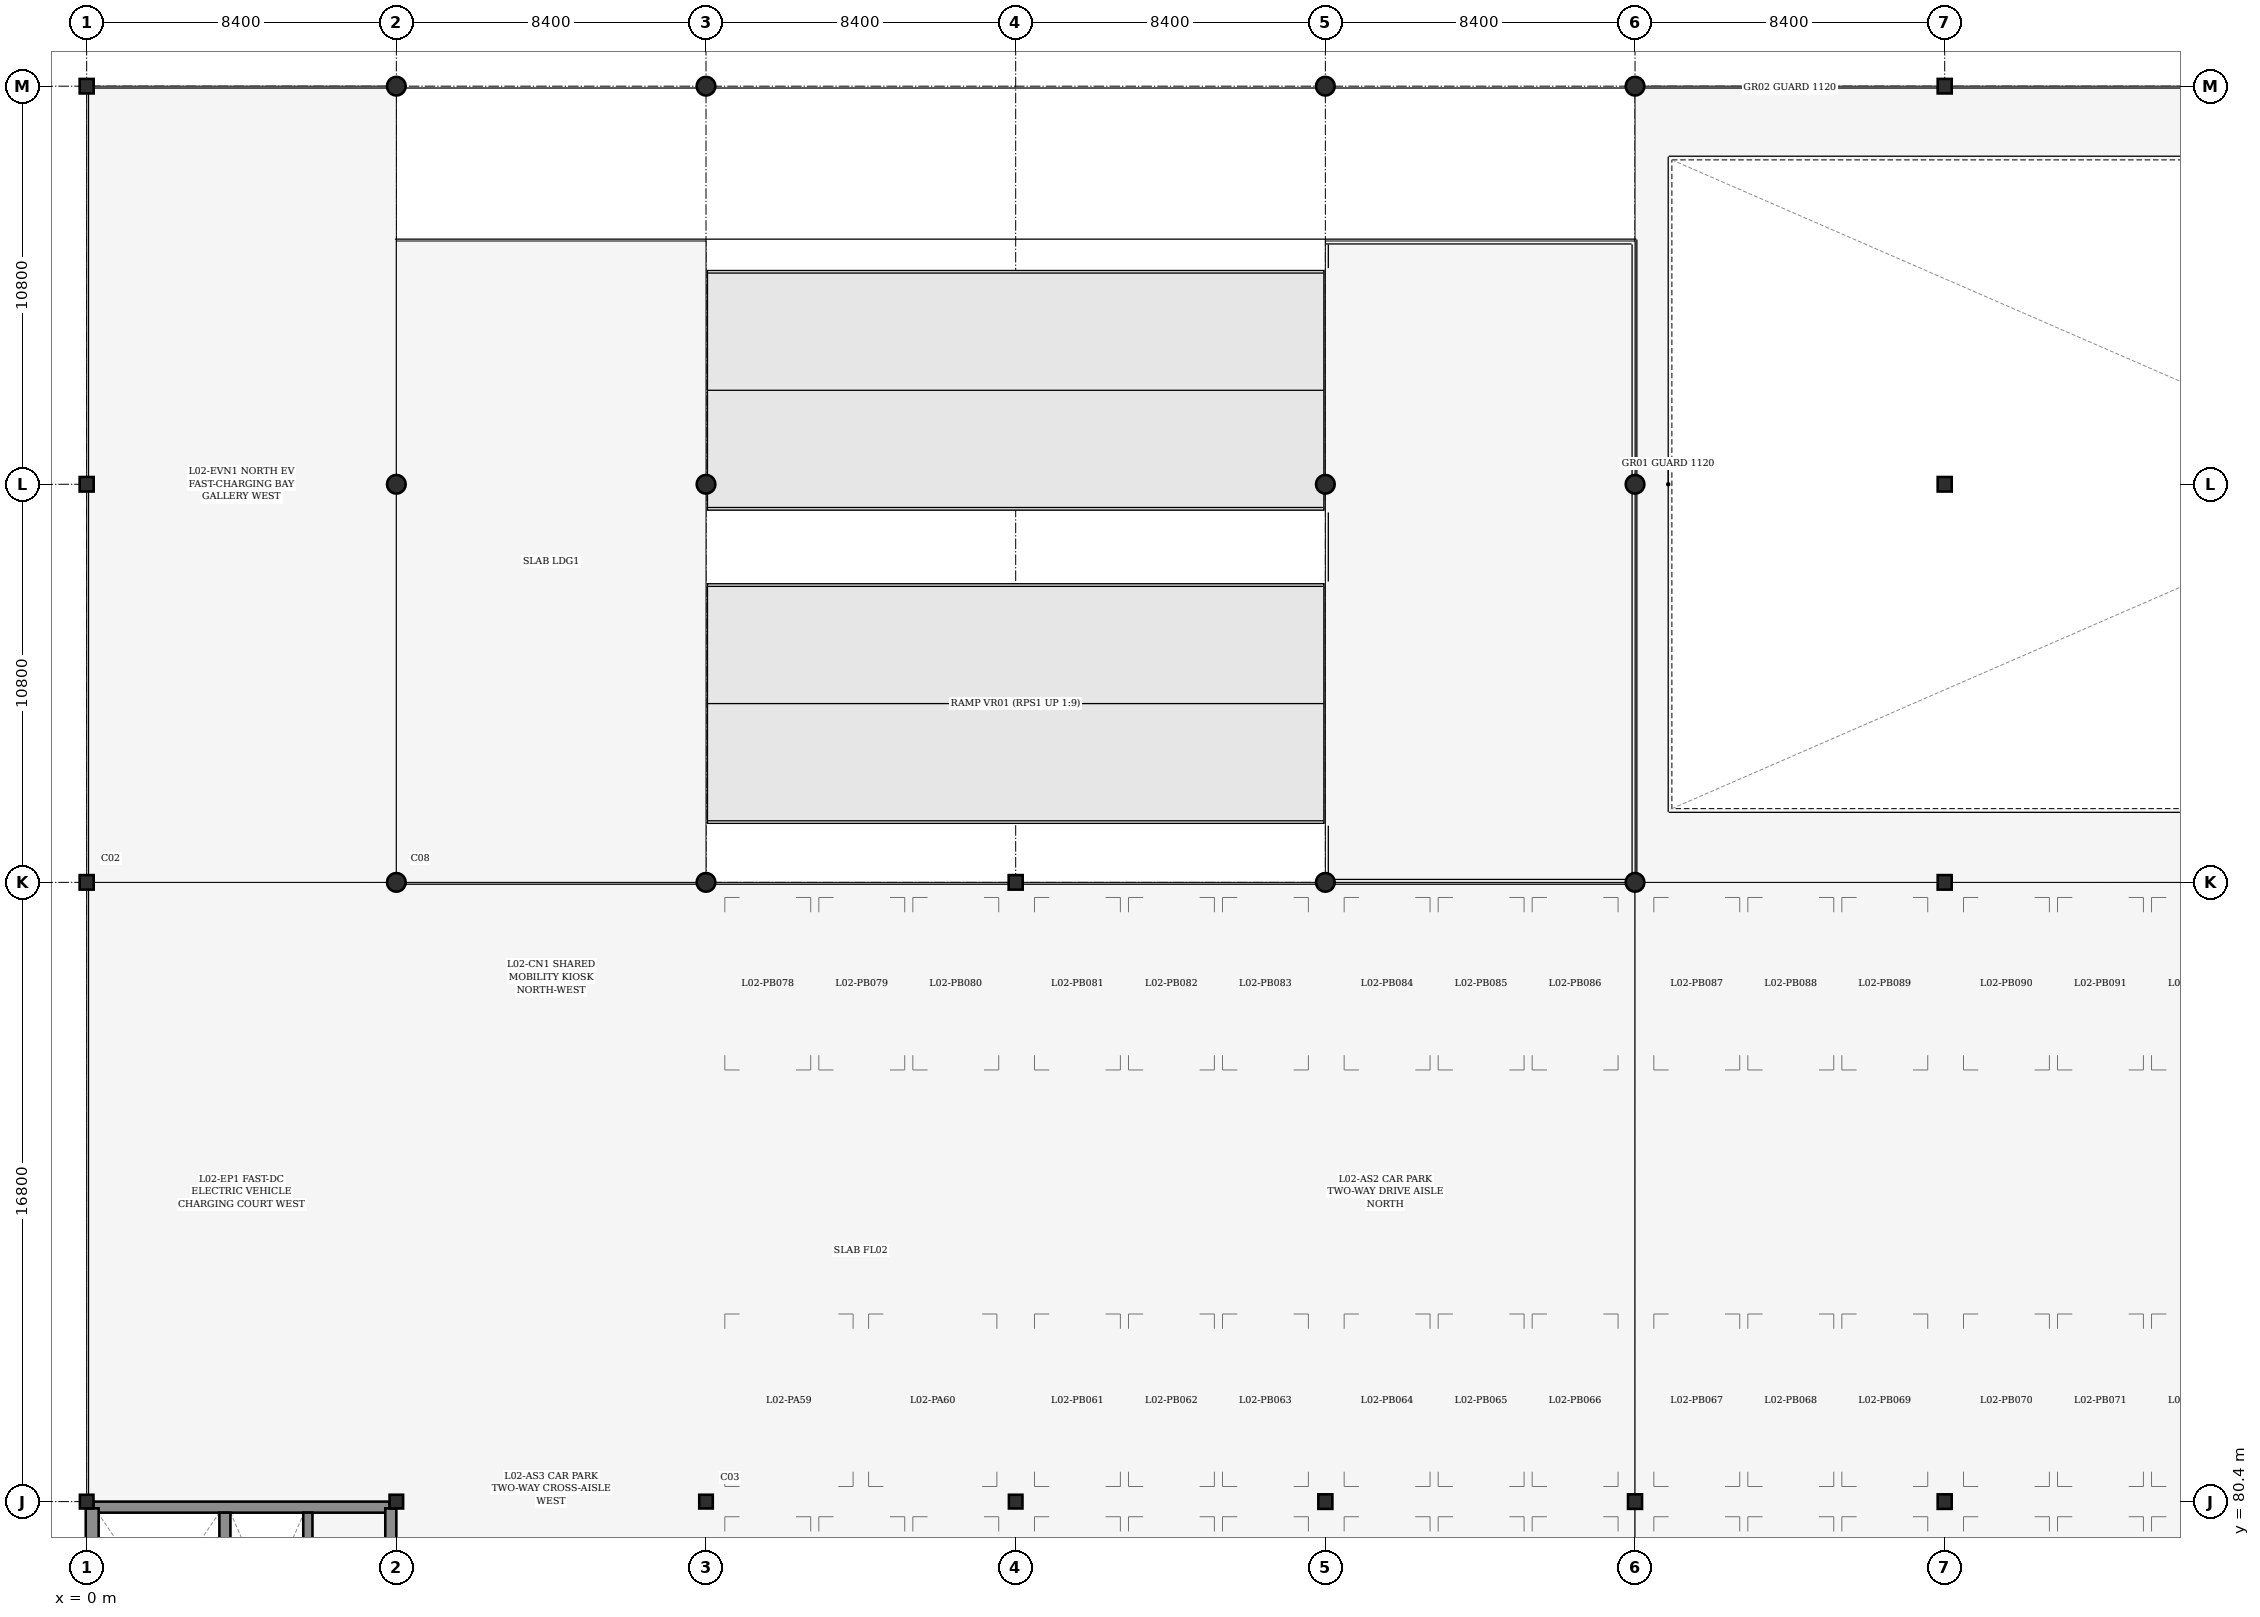
"""IFC4 building model, lengths in metres.
Left out: names, types, materials, properties, quantities, classifications, styles, units other than length and angle.
Written with IfcOpenShell. Run it as: python <this file> out.ifc"""

import sys

from ifc_helpers import new_model, si_unit, direction, frame, frame_2d, origin, origin_2d, place, context, subcontext, project, spatial, rectangle, hollow_circle, i_section, extrude, element, save


model = new_model("IFC4")
c1 = context("Model", 3, precision=1e-05, world=origin(), true_north=direction((0.0, 1.0)))
c2 = subcontext(c1, "Body", "Model", "MODEL_VIEW")
j1 = project(units=[si_unit("LENGTHUNIT", "METRE"), si_unit("PLANEANGLEUNIT", "RADIAN")], contexts=[c1])
p1 = place(None, origin())
s1 = spatial("IfcSite", under=j1, at=p1, CompositionType="ELEMENT")
p2 = place(p1, origin())
s2 = spatial("IfcBuilding", under=s1, at=p2, CompositionType="ELEMENT")
p3 = place(p2, frame((0.0, 0.0, 9.0)))
s3 = spatial("IfcBuildingStorey", under=s2, at=p3, CompositionType="ELEMENT", Elevation=9.0)
p4 = place(p3, frame((0.0, 80.4, 0.0), z_axis=(0.0, 0.0, 1.0), x_axis=(1.0, 0.0, 0.0)))
e1 = element("IfcColumn", 1, at=p4, inside=s3, PredefinedType="COLUMN", context=c2, shape_type="SweptSolid", body=[
    extrude(i_section(OverallWidth=0.373, OverallDepth=0.368, WebThickness=0.014, FlangeThickness=0.024, FilletRadius=0.015, at=origin_2d()), origin(), (0.0, 0.0, 1.0), 3.6),
])
for number, where, z_axis, x_axis in (
    (2, (0.0, 97.2, 0.0), (0.0, 0.0, 1.0), (1.0, 0.0, 0.0)),
    (3, (0.0, 108.0, 0.0), (0.0, 0.0, 1.0), (1.0, 0.0, 0.0)),
    (4, (0.0, 118.8, 0.0), (0.0, 0.0, 1.0), (1.0, 0.0, 0.0)),
):
    element("IfcColumn", number, at=place(p3, frame(where, z_axis=z_axis, x_axis=x_axis)), inside=s3, PredefinedType="COLUMN", context=c2, shape_type="SweptSolid", body=[
        extrude(i_section(OverallWidth=0.395, OverallDepth=0.381, WebThickness=0.018, FlangeThickness=0.03, FilletRadius=0.015, at=origin_2d()), origin(), (0.0, 0.0, 1.0), 3.6),
    ])
p5 = place(p3, frame((8.4, 80.4, 0.0), z_axis=(0.0, 0.0, 1.0), x_axis=(1.0, 0.0, 0.0)))
e5 = element("IfcColumn", 5, at=p5, inside=s3, PredefinedType="COLUMN", context=c2, shape_type="SweptSolid", body=[
    extrude(i_section(OverallWidth=0.373, OverallDepth=0.368, WebThickness=0.014, FlangeThickness=0.024, FilletRadius=0.015, at=origin_2d()), origin(), (0.0, 0.0, 1.0), 3.6),
])
for number, where, z_axis, x_axis in (
    (6, (8.4, 97.2, 0.0), (0.0, 0.0, 1.0), (1.0, 0.0, 0.0)),
    (7, (8.4, 108.0, 0.0), (0.0, 0.0, 1.0), (1.0, 0.0, 0.0)),
    (8, (8.4, 118.8, 0.0), (0.0, 0.0, 1.0), (1.0, 0.0, 0.0)),
):
    element("IfcColumn", number, at=place(p3, frame(where, z_axis=z_axis, x_axis=x_axis)), inside=s3, PredefinedType="COLUMN", context=c2, shape_type="SweptSolid", body=[
        extrude(hollow_circle(Radius=0.254, WallThickness=0.016, at=origin_2d()), origin(), (0.0, 0.0, 1.0), 3.6),
    ])
p6 = place(p3, frame((16.8, 80.4, 0.0), z_axis=(0.0, 0.0, 1.0), x_axis=(1.0, 0.0, 0.0)))
e9 = element("IfcColumn", 9, at=p6, inside=s3, PredefinedType="COLUMN", context=c2, shape_type="SweptSolid", body=[
    extrude(i_section(OverallWidth=0.373, OverallDepth=0.368, WebThickness=0.014, FlangeThickness=0.024, FilletRadius=0.015, at=origin_2d()), origin(), (0.0, 0.0, 1.0), 3.6),
])
for number, where, z_axis, x_axis in (
    (10, (16.8, 97.2, 0.0), (0.0, 0.0, 1.0), (1.0, 0.0, 0.0)),
    (11, (16.8, 108.0, 0.0), (0.0, 0.0, 1.0), (1.0, 0.0, 0.0)),
    (12, (16.8, 118.8, 0.0), (0.0, 0.0, 1.0), (1.0, 0.0, 0.0)),
):
    element("IfcColumn", number, at=place(p3, frame(where, z_axis=z_axis, x_axis=x_axis)), inside=s3, PredefinedType="COLUMN", context=c2, shape_type="SweptSolid", body=[
        extrude(hollow_circle(Radius=0.254, WallThickness=0.016, at=origin_2d()), origin(), (0.0, 0.0, 1.0), 3.6),
    ])
p7 = place(p3, frame((25.2, 80.4, 0.0), z_axis=(0.0, 0.0, 1.0), x_axis=(1.0, 0.0, 0.0)))
e13 = element("IfcColumn", 13, at=p7, inside=s3, PredefinedType="COLUMN", context=c2, shape_type="SweptSolid", body=[
    extrude(i_section(OverallWidth=0.373, OverallDepth=0.368, WebThickness=0.014, FlangeThickness=0.024, FilletRadius=0.015, at=origin_2d()), origin(), (0.0, 0.0, 1.0), 3.6),
])
for number, where, z_axis, x_axis in (
    (14, (25.2, 97.2, 0.0), (0.0, 0.0, 1.0), (1.0, 0.0, 0.0)),
    (15, (33.6, 80.4, 0.0), (0.0, 0.0, 1.0), (1.0, 0.0, 0.0)),
):
    element("IfcColumn", number, at=place(p3, frame(where, z_axis=z_axis, x_axis=x_axis)), inside=s3, PredefinedType="COLUMN", context=c2, shape_type="SweptSolid", body=[
        extrude(i_section(OverallWidth=0.395, OverallDepth=0.381, WebThickness=0.018, FlangeThickness=0.03, FilletRadius=0.015, at=origin_2d()), origin(), (0.0, 0.0, 1.0), 3.6),
    ])
for number, where, z_axis, x_axis in (
    (16, (33.6, 97.2, 0.0), (0.0, 0.0, 1.0), (1.0, 0.0, 0.0)),
    (17, (33.6, 108.0, 0.0), (0.0, 0.0, 1.0), (1.0, 0.0, 0.0)),
    (18, (33.6, 118.8, 0.0), (0.0, 0.0, 1.0), (1.0, 0.0, 0.0)),
):
    element("IfcColumn", number, at=place(p3, frame(where, z_axis=z_axis, x_axis=x_axis)), inside=s3, PredefinedType="COLUMN", context=c2, shape_type="SweptSolid", body=[
        extrude(hollow_circle(Radius=0.254, WallThickness=0.016, at=origin_2d()), origin(), (0.0, 0.0, 1.0), 3.6),
    ])
p8 = place(p3, frame((42.0, 80.4, 0.0), z_axis=(0.0, 0.0, 1.0), x_axis=(1.0, 0.0, 0.0)))
e19 = element("IfcColumn", 19, at=p8, inside=s3, PredefinedType="COLUMN", context=c2, shape_type="SweptSolid", body=[
    extrude(i_section(OverallWidth=0.395, OverallDepth=0.381, WebThickness=0.018, FlangeThickness=0.03, FilletRadius=0.015, at=origin_2d()), origin(), (0.0, 0.0, 1.0), 3.6),
])
for number, where, z_axis, x_axis in (
    (20, (42.0, 97.2, 0.0), (0.0, 0.0, 1.0), (1.0, 0.0, 0.0)),
    (21, (42.0, 108.0, 0.0), (0.0, 0.0, 1.0), (1.0, 0.0, 0.0)),
    (22, (42.0, 118.8, 0.0), (0.0, 0.0, 1.0), (1.0, 0.0, 0.0)),
):
    element("IfcColumn", number, at=place(p3, frame(where, z_axis=z_axis, x_axis=x_axis)), inside=s3, PredefinedType="COLUMN", context=c2, shape_type="SweptSolid", body=[
        extrude(hollow_circle(Radius=0.254, WallThickness=0.016, at=origin_2d()), origin(), (0.0, 0.0, 1.0), 3.6),
    ])
for number, where, z_axis, x_axis in (
    (23, (50.4, 80.4, 0.0), (0.0, 0.0, 1.0), (1.0, 0.0, 0.0)),
    (24, (50.4, 97.2, 0.0), (0.0, 0.0, 1.0), (1.0, 0.0, 0.0)),
    (25, (50.4, 108.0, 0.0), (0.0, 0.0, 1.0), (1.0, 0.0, 0.0)),
    (26, (50.4, 118.8, 0.0), (0.0, 0.0, 1.0), (1.0, 0.0, 0.0)),
):
    element("IfcColumn", number, at=place(p3, frame(where, z_axis=z_axis, x_axis=x_axis)), inside=s3, PredefinedType="COLUMN", context=c2, shape_type="SweptSolid", body=[
        extrude(i_section(OverallWidth=0.395, OverallDepth=0.381, WebThickness=0.018, FlangeThickness=0.03, FilletRadius=0.015, at=origin_2d()), origin(), (0.0, 0.0, 1.0), 3.6),
    ])
p9 = place(p3, frame((0.185, 80.25, 0.0), z_axis=(0.0, 0.0, 1.0), x_axis=(1.0, 0.0, 0.0)))
e27 = element("IfcWall", 27, at=p9, inside=s3, PredefinedType="SHEAR", context=c2, shape_type="SweptSolid", body=[
    extrude(rectangle(XDim=8.031, YDim=0.3, at=frame_2d((4.016, 0.0))), origin(), (0.0, 0.0, 1.0), 3.38),
])
p10 = place(p3, frame((0.15, 63.782, 0.0), z_axis=(0.0, 0.0, 1.0), x_axis=(0.0, 1.0, 0.0)))
e28 = element("IfcWall", 28, at=p10, inside=s3, PredefinedType="SHEAR", context=c2, shape_type="SweptSolid", body=[
    extrude(rectangle(XDim=16.436, YDim=0.35, at=frame_2d((8.218, 0.0))), origin(), (0.0, 0.0, 1.0), 3.38),
])
p11 = place(p3, frame((8.25, 63.782, 0.0), z_axis=(0.0, 0.0, 1.0), x_axis=(0.0, 1.0, 0.0)))
e29 = element("IfcWall", 29, at=p11, inside=s3, PredefinedType="SHEAR", context=c2, shape_type="SweptSolid", body=[
    extrude(rectangle(XDim=16.436, YDim=0.3, at=frame_2d((8.218, 0.0))), origin(), (0.0, 0.0, 1.0), 3.38),
])
p12 = place(p11, frame((5.668, 0.0, 0.0)))
e30 = element("IfcOpeningElement", 30, at=p12, cuts=e29, PredefinedType="OPENING", context=c2, shape_type="SweptSolid", body=[
    extrude(rectangle(XDim=1.25, YDim=2.15, at=frame_2d((0.625, 1.075))), frame((0.0, 0.16, 0.0), z_axis=(0.0, -1.0, 0.0), x_axis=(1.0, 0.0, 0.0)), (0.0, 0.0, 1.0), 0.32),
])
p13 = place(p3, frame((3.75, 63.9, 0.0), z_axis=(0.0, 0.0, 1.0), x_axis=(0.0, 1.0, 0.0)))
e31 = element("IfcWall", 31, at=p13, inside=s3, PredefinedType="SHEAR", context=c2, shape_type="SweptSolid", body=[
    extrude(rectangle(XDim=16.2, YDim=0.3, at=frame_2d((8.1, 0.0))), origin(), (0.0, 0.0, 1.0), 3.38),
])
p14 = place(p13, frame((0.5, 0.0, 0.0)))
e32 = element("IfcOpeningElement", 32, at=p14, cuts=e31, PredefinedType="OPENING", context=c2, shape_type="SweptSolid", body=[
    extrude(rectangle(XDim=1.15, YDim=2.15, at=frame_2d((0.575, 1.075))), frame((0.0, 0.16, 0.0), z_axis=(0.0, -1.0, 0.0), x_axis=(1.0, 0.0, 0.0)), (0.0, 0.0, 1.0), 0.32),
])
p15 = place(p3, frame((6.0, 75.55, 0.0), z_axis=(0.0, 0.0, 1.0), x_axis=(0.0, 1.0, 0.0)))
e33 = element("IfcWall", 33, at=p15, inside=s3, PredefinedType="PARTITIONING", context=c2, shape_type="SweptSolid", body=[
    extrude(rectangle(XDim=4.55, YDim=0.25, at=frame_2d((2.275, 0.0))), origin(), (0.0, 0.0, 1.0), 2.525),
])
save(model, sys.argv[1])
